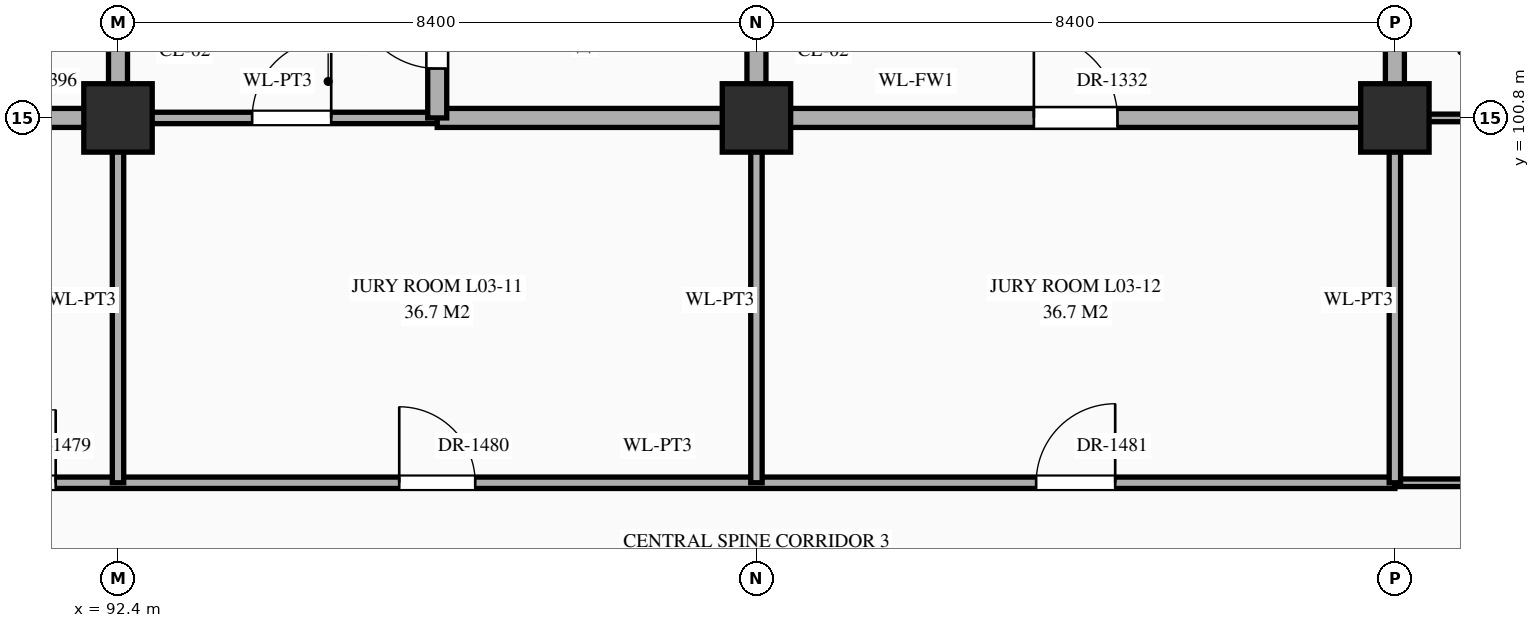
"""IFC4 building model, lengths in metres.
Left out: names, types, materials, properties, quantities, classifications, styles, units other than length and angle.
Written with IfcOpenShell. Run it as: python <this file> out.ifc"""

import sys

from ifc_helpers import new_model, si_unit, direction, frame, frame_2d, origin, origin_2d, place, context, subcontext, project, spatial, rectangle, extrude, element, fill, save


model = new_model("IFC4")
c1 = context("Model", 3, precision=1e-05, world=origin(), true_north=direction((0.0, 1.0)))
c2 = subcontext(c1, "Body", "Model", "MODEL_VIEW")
j1 = project(units=[si_unit("LENGTHUNIT", "METRE"), si_unit("PLANEANGLEUNIT", "RADIAN")], contexts=[c1])
p1 = place(None, origin())
s1 = spatial("IfcSite", under=j1, at=p1, CompositionType="ELEMENT")
p2 = place(p1, origin())
s2 = spatial("IfcBuilding", under=s1, at=p2, CompositionType="ELEMENT")
p3 = place(p2, frame((0.0, 0.0, 10.8)))
s3 = spatial("IfcBuildingStorey", under=s2, at=p3, CompositionType="ELEMENT", Elevation=10.8)
for number, where, z_axis, x_axis in (
    (1, (92.4, 100.8, 0.0), (0.0, 0.0, 1.0), (1.0, 0.0, 0.0)),
    (2, (100.8, 100.8, 0.0), (0.0, 0.0, 1.0), (1.0, 0.0, 0.0)),
    (3, (109.2, 100.8, 0.0), (0.0, 0.0, 1.0), (1.0, 0.0, 0.0)),
):
    element("IfcColumn", number, at=place(p3, frame(where, z_axis=z_axis, x_axis=x_axis)), inside=s3, PredefinedType="COLUMN", context=c2, shape_type="SweptSolid", body=[
        extrude(rectangle(XDim=0.9, YDim=0.9, at=origin_2d()), origin(), (0.0, 0.0, 1.0), 5.4),
    ])
p4 = place(p3, frame((89.8, 96.0, 0.0), z_axis=(0.0, 0.0, 1.0), x_axis=(1.0, 0.0, 0.0)))
e4 = element("IfcWall", 4, at=p4, inside=s3, PredefinedType="STANDARD", context=c2, shape_type="SweptSolid", body=[
    extrude(rectangle(XDim=19.4, YDim=0.15, at=frame_2d((9.7, 0.0))), origin(), (0.0, 0.0, 1.0), 5.12),
])
p5 = place(p4, frame((0.82, 0.0, 0.0)))
e5 = element("IfcOpeningElement", 5, at=p5, cuts=e4, PredefinedType="OPENING", context=c2, shape_type="SweptSolid", body=[
    extrude(rectangle(XDim=0.96, YDim=2.2, at=frame_2d((0.48, 1.1))), frame((0.0, 0.087, 0.0), z_axis=(0.0, -1.0, 0.0), x_axis=(1.0, 0.0, 0.0)), (0.0, 0.0, 1.0), 0.174),
])
p6 = place(p4, frame((6.3, 0.0, 0.0)))
e6 = element("IfcOpeningElement", 6, at=p6, cuts=e4, PredefinedType="OPENING", context=c2, shape_type="SweptSolid", body=[
    extrude(rectangle(XDim=1.0, YDim=2.25, at=frame_2d((0.5, 1.125))), frame((0.0, 0.087, 0.0), z_axis=(0.0, -1.0, 0.0), x_axis=(1.0, 0.0, 0.0)), (0.0, 0.0, 1.0), 0.174),
])
p7 = place(p4, frame((14.68, 0.0, 0.0)))
e7 = element("IfcOpeningElement", 7, at=p7, cuts=e4, PredefinedType="OPENING", context=c2, shape_type="SweptSolid", body=[
    extrude(rectangle(XDim=1.04, YDim=2.2, at=frame_2d((0.52, 1.1))), frame((0.0, 0.087, 0.0), z_axis=(0.0, -1.0, 0.0), x_axis=(1.0, 0.0, 0.0)), (0.0, 0.0, 1.0), 0.174),
])
p8 = place(p3, frame((109.2, 96.0, 0.0), z_axis=(0.0, 0.0, 1.0), x_axis=(1.0, 0.0, 0.0)))
e8 = element("IfcWall", 8, at=p8, inside=s3, PredefinedType="STANDARD", context=c2, shape_type="SweptSolid", body=[
    extrude(rectangle(XDim=5.8, YDim=0.1, at=frame_2d((2.9, 0.0))), origin(), (0.0, 0.0, 1.0), 5.12),
])
p9 = place(p8, frame((1.16, 0.0, 0.0)))
e9 = element("IfcOpeningElement", 9, at=p9, cuts=e8, PredefinedType="OPENING", context=c2, shape_type="SweptSolid", body=[
    extrude(rectangle(XDim=1.08, YDim=2.25, at=frame_2d((0.54, 1.125))), frame((0.0, 0.062, 0.0), z_axis=(0.0, -1.0, 0.0), x_axis=(1.0, 0.0, 0.0)), (0.0, 0.0, 1.0), 0.124),
])
p10 = place(p8, frame((4.04, 0.0, 0.0)))
e10 = element("IfcOpeningElement", 10, at=p10, cuts=e8, PredefinedType="OPENING", context=c2, shape_type="SweptSolid", body=[
    extrude(rectangle(XDim=1.12, YDim=2.25, at=frame_2d((0.56, 1.125))), frame((0.0, 0.062, 0.0), z_axis=(0.0, -1.0, 0.0), x_axis=(1.0, 0.0, 0.0)), (0.0, 0.0, 1.0), 0.124),
])
p11 = place(p3, frame((75.6, 100.8, 0.0), z_axis=(0.0, 0.0, 1.0), x_axis=(1.0, 0.0, 0.0)))
e11 = element("IfcWall", 11, at=p11, inside=s3, PredefinedType="STANDARD", context=c2, shape_type="SweptSolid", body=[
    extrude(rectangle(XDim=16.8, YDim=0.25, at=frame_2d((8.4, 0.0))), origin(), (0.0, 0.0, 1.0), 4.27),
])
p12 = place(p11, frame((3.65, 0.0, 0.0)))
e12 = element("IfcOpeningElement", 12, at=p12, cuts=e11, PredefinedType="OPENING", context=c2, shape_type="SweptSolid", body=[
    extrude(rectangle(XDim=1.1, YDim=2.2, at=frame_2d((0.55, 1.1))), frame((0.0, 0.137, 0.0), z_axis=(0.0, -1.0, 0.0), x_axis=(1.0, 0.0, 0.0)), (0.0, 0.0, 1.0), 0.274),
])
p13 = place(p11, frame((9.81, 0.0, 0.0)))
e13 = element("IfcOpeningElement", 13, at=p13, cuts=e11, PredefinedType="OPENING", context=c2, shape_type="SweptSolid", body=[
    extrude(rectangle(XDim=0.95, YDim=2.15, at=frame_2d((0.475, 1.075))), frame((0.0, 0.137, 0.0), z_axis=(0.0, -1.0, 0.0), x_axis=(1.0, 0.0, 0.0)), (0.0, 0.0, 1.0), 0.274),
])
p14 = place(p11, frame((12.45, 0.0, 0.0)))
e14 = element("IfcOpeningElement", 14, at=p14, cuts=e11, PredefinedType="OPENING", context=c2, shape_type="SweptSolid", body=[
    extrude(rectangle(XDim=1.1, YDim=2.2, at=frame_2d((0.55, 1.1))), frame((0.0, 0.137, 0.0), z_axis=(0.0, -1.0, 0.0), x_axis=(1.0, 0.0, 0.0)), (0.0, 0.0, 1.0), 0.274),
])
p15 = place(p11, frame((14.815, 0.0, 0.0)))
e15 = element("IfcOpeningElement", 15, at=p15, cuts=e11, PredefinedType="OPENING", context=c2, shape_type="SweptSolid", body=[
    extrude(rectangle(XDim=1.0, YDim=2.2, at=frame_2d((0.5, 1.1))), frame((0.0, 0.137, 0.0), z_axis=(0.0, -1.0, 0.0), x_axis=(1.0, 0.0, 0.0)), (0.0, 0.0, 1.0), 0.274),
])
p16 = place(p3, frame((92.4, 100.8, 0.0), z_axis=(0.0, 0.0, 1.0), x_axis=(1.0, 0.0, 0.0)))
e16 = element("IfcWall", 16, at=p16, inside=s3, PredefinedType="STANDARD", context=c2, shape_type="SweptSolid", body=[
    extrude(rectangle(XDim=4.2, YDim=0.15, at=frame_2d((2.1, 0.0))), origin(), (0.0, 0.0, 1.0), 4.27),
])
p17 = place(p16, frame((1.765, 0.0, 0.0)))
e17 = element("IfcOpeningElement", 17, at=p17, cuts=e16, PredefinedType="OPENING", context=c2, shape_type="SweptSolid", body=[
    extrude(rectangle(XDim=1.04, YDim=2.2, at=frame_2d((0.52, 1.1))), frame((0.0, 0.087, 0.0), z_axis=(0.0, -1.0, 0.0), x_axis=(1.0, 0.0, 0.0)), (0.0, 0.0, 1.0), 0.174),
])
p18 = place(p3, frame((96.6, 100.8, 0.0), z_axis=(0.0, 0.0, 1.0), x_axis=(1.0, 0.0, 0.0)))
e18 = element("IfcWall", 18, at=p18, inside=s3, PredefinedType="STANDARD", context=c2, shape_type="SweptSolid", body=[
    extrude(rectangle(XDim=12.6, YDim=0.25, at=frame_2d((6.3, 0.0))), origin(), (0.0, 0.0, 1.0), 4.27),
])
p19 = place(p18, frame((7.85, 0.0, 0.0)))
e19 = element("IfcOpeningElement", 19, at=p19, cuts=e18, PredefinedType="OPENING", context=c2, shape_type="SweptSolid", body=[
    extrude(rectangle(XDim=1.1, YDim=2.2, at=frame_2d((0.55, 1.1))), frame((0.0, 0.137, 0.0), z_axis=(0.0, -1.0, 0.0), x_axis=(1.0, 0.0, 0.0)), (0.0, 0.0, 1.0), 0.274),
])
p20 = place(p3, frame((109.2, 100.8, 0.0), z_axis=(0.0, 0.0, 1.0), x_axis=(1.0, 0.0, 0.0)))
e20 = element("IfcWall", 20, at=p20, inside=s3, PredefinedType="STANDARD", context=c2, shape_type="SweptSolid", body=[
    extrude(rectangle(XDim=3.4, YDim=0.1, at=frame_2d((1.7, 0.0))), origin(), (0.0, 0.0, 1.0), 4.27),
])
p21 = place(p20, frame((1.425, 0.0, 0.0)))
e21 = element("IfcOpeningElement", 21, at=p21, cuts=e20, PredefinedType="OPENING", context=c2, shape_type="SweptSolid", body=[
    extrude(rectangle(XDim=0.92, YDim=2.15, at=frame_2d((0.46, 1.075))), frame((0.0, 0.062, 0.0), z_axis=(0.0, -1.0, 0.0), x_axis=(1.0, 0.0, 0.0)), (0.0, 0.0, 1.0), 0.124),
])
p22 = place(p3, frame((92.4, 96.0, 0.0), z_axis=(0.0, 0.0, 1.0), x_axis=(0.0, 1.0, 0.0)))
e22 = element("IfcWall", 22, at=p22, inside=s3, PredefinedType="STANDARD", context=c2, shape_type="SweptSolid", body=[
    extrude(rectangle(XDim=4.8, YDim=0.15, at=frame_2d((2.4, 0.0))), origin(), (0.0, 0.0, 1.0), 4.37),
])
p23 = place(p3, frame((92.4, 100.8, 0.0), z_axis=(0.0, 0.0, 1.0), x_axis=(0.0, 1.0, 0.0)))
e23 = element("IfcWall", 23, at=p23, inside=s3, PredefinedType="STANDARD", context=c2, shape_type="SweptSolid", body=[
    extrude(rectangle(XDim=3.6, YDim=0.25, at=frame_2d((1.8, 0.0))), origin(), (0.0, 0.0, 1.0), 4.37),
])
p24 = place(p23, frame((0.885, 0.0, 0.0)))
e24 = element("IfcOpeningElement", 24, at=p24, cuts=e23, PredefinedType="OPENING", context=c2, shape_type="SweptSolid", body=[
    extrude(rectangle(XDim=1.0, YDim=2.2, at=frame_2d((0.5, 1.1))), frame((0.0, 0.137, 0.0), z_axis=(0.0, -1.0, 0.0), x_axis=(1.0, 0.0, 0.0)), (0.0, 0.0, 1.0), 0.274),
])
p25 = place(p3, frame((96.6, 100.8, 0.0), z_axis=(0.0, 0.0, 1.0), x_axis=(0.0, 1.0, 0.0)))
e25 = element("IfcWall", 25, at=p25, inside=s3, PredefinedType="STANDARD", context=c2, shape_type="SweptSolid", body=[
    extrude(rectangle(XDim=3.6, YDim=0.25, at=frame_2d((1.8, 0.0))), origin(), (0.0, 0.0, 1.0), 4.72),
])
p26 = place(p25, frame((0.65, 0.0, 0.0)))
e26 = element("IfcOpeningElement", 26, at=p26, cuts=e25, PredefinedType="OPENING", context=c2, shape_type="SweptSolid", body=[
    extrude(rectangle(XDim=1.1, YDim=2.2, at=frame_2d((0.55, 1.1))), frame((0.0, 0.137, 0.0), z_axis=(0.0, -1.0, 0.0), x_axis=(1.0, 0.0, 0.0)), (0.0, 0.0, 1.0), 0.274),
])
p27 = place(p3, frame((100.8, 96.0, 0.0), z_axis=(0.0, 0.0, 1.0), x_axis=(0.0, 1.0, 0.0)))
e27 = element("IfcWall", 27, at=p27, inside=s3, PredefinedType="STANDARD", context=c2, shape_type="SweptSolid", body=[
    extrude(rectangle(XDim=4.8, YDim=0.15, at=frame_2d((2.4, 0.0))), origin(), (0.0, 0.0, 1.0), 4.37),
])
p28 = place(p3, frame((100.8, 100.8, 0.0), z_axis=(0.0, 0.0, 1.0), x_axis=(0.0, 1.0, 0.0)))
e28 = element("IfcWall", 28, at=p28, inside=s3, PredefinedType="STANDARD", context=c2, shape_type="SweptSolid", body=[
    extrude(rectangle(XDim=2.4, YDim=0.25, at=frame_2d((1.2, 0.0))), origin(), (0.0, 0.0, 1.0), 4.37),
])
p29 = place(p28, frame((0.885, 0.0, 0.0)))
e29 = element("IfcOpeningElement", 29, at=p29, cuts=e28, PredefinedType="OPENING", context=c2, shape_type="SweptSolid", body=[
    extrude(rectangle(XDim=1.0, YDim=2.2, at=frame_2d((0.5, 1.1))), frame((0.0, 0.137, 0.0), z_axis=(0.0, -1.0, 0.0), x_axis=(1.0, 0.0, 0.0)), (0.0, 0.0, 1.0), 0.274),
])
p30 = place(p3, frame((109.2, 96.0, 0.0), z_axis=(0.0, 0.0, 1.0), x_axis=(0.0, 1.0, 0.0)))
e30 = element("IfcWall", 30, at=p30, inside=s3, PredefinedType="STANDARD", context=c2, shape_type="SweptSolid", body=[
    extrude(rectangle(XDim=4.8, YDim=0.15, at=frame_2d((2.4, 0.0))), origin(), (0.0, 0.0, 1.0), 4.37),
])
p31 = place(p3, frame((109.2, 100.8, 0.0), z_axis=(0.0, 0.0, 1.0), x_axis=(0.0, 1.0, 0.0)))
e31 = element("IfcWall", 31, at=p31, inside=s3, PredefinedType="STANDARD", context=c2, shape_type="SweptSolid", body=[
    extrude(rectangle(XDim=2.4, YDim=0.25, at=frame_2d((1.2, 0.0))), origin(), (0.0, 0.0, 1.0), 4.37),
])
p32 = place(p31, frame((0.91, 0.0, 0.0)))
e32 = element("IfcOpeningElement", 32, at=p32, cuts=e31, PredefinedType="OPENING", context=c2, shape_type="SweptSolid", body=[
    extrude(rectangle(XDim=0.95, YDim=2.15, at=frame_2d((0.475, 1.075))), frame((0.0, 0.137, 0.0), z_axis=(0.0, -1.0, 0.0), x_axis=(1.0, 0.0, 0.0)), (0.0, 0.0, 1.0), 0.274),
])
p33 = place(p19, origin())
e33 = element("IfcDoor", 33, at=p33, inside=s3, OperationType="SINGLE_SWING_LEFT", PredefinedType="DOOR", context=c2, shape_type="SweptSolid", body=[
    extrude(rectangle(XDim=1.1, YDim=2.2, at=frame_2d((0.55, 1.1))), frame((0.0, 0.025, 0.0), z_axis=(0.0, -1.0, 0.0), x_axis=(1.0, 0.0, 0.0)), (0.0, 0.0, 1.0), 0.05),
])
fill(e19, e33)
p34 = place(p26, origin())
e34 = element("IfcDoor", 34, at=p34, inside=s3, OperationType="SINGLE_SWING_RIGHT", PredefinedType="DOOR", context=c2, shape_type="SweptSolid", body=[
    extrude(rectangle(XDim=1.1, YDim=2.2, at=frame_2d((0.55, 1.1))), frame((0.0, 0.025, 0.0), z_axis=(0.0, -1.0, 0.0), x_axis=(1.0, 0.0, 0.0)), (0.0, 0.0, 1.0), 0.05),
])
fill(e26, e34)
p35 = place(p17, origin())
e35 = element("IfcDoor", 35, at=p35, inside=s3, OperationType="SINGLE_SWING_RIGHT", PredefinedType="DOOR", context=c2, shape_type="SweptSolid", body=[
    extrude(rectangle(XDim=1.04, YDim=2.2, at=frame_2d((0.52, 1.1))), frame((0.0, 0.025, 0.0), z_axis=(0.0, -1.0, 0.0), x_axis=(1.0, 0.0, 0.0)), (0.0, 0.0, 1.0), 0.05),
])
fill(e17, e35)
p36 = place(p5, origin())
e36 = element("IfcDoor", 36, at=p36, inside=s3, OperationType="SINGLE_SWING_RIGHT", PredefinedType="DOOR", context=c2, shape_type="SweptSolid", body=[
    extrude(rectangle(XDim=0.96, YDim=2.2, at=frame_2d((0.48, 1.1))), frame((0.0, 0.025, 0.0), z_axis=(0.0, -1.0, 0.0), x_axis=(1.0, 0.0, 0.0)), (0.0, 0.0, 1.0), 0.05),
])
fill(e5, e36)
p37 = place(p6, origin())
e37 = element("IfcDoor", 37, at=p37, inside=s3, OperationType="SINGLE_SWING_LEFT", PredefinedType="DOOR", context=c2, shape_type="SweptSolid", body=[
    extrude(rectangle(XDim=1.0, YDim=2.25, at=frame_2d((0.5, 1.125))), frame((0.0, 0.025, 0.0), z_axis=(0.0, -1.0, 0.0), x_axis=(1.0, 0.0, 0.0)), (0.0, 0.0, 1.0), 0.05),
])
fill(e6, e37)
p38 = place(p7, origin())
e38 = element("IfcDoor", 38, at=p38, inside=s3, OperationType="SINGLE_SWING_RIGHT", PredefinedType="DOOR", context=c2, shape_type="SweptSolid", body=[
    extrude(rectangle(XDim=1.04, YDim=2.2, at=frame_2d((0.52, 1.1))), frame((0.0, 0.025, 0.0), z_axis=(0.0, -1.0, 0.0), x_axis=(1.0, 0.0, 0.0)), (0.0, 0.0, 1.0), 0.05),
])
fill(e7, e38)
save(model, sys.argv[1])
